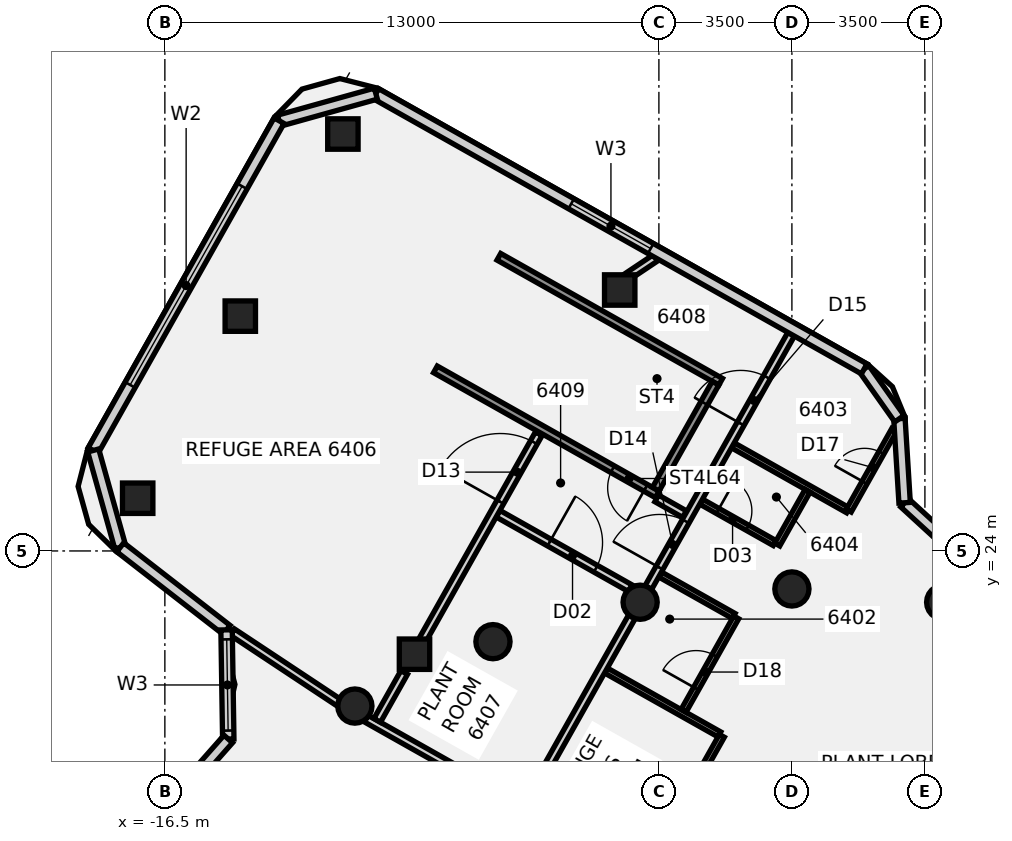
"""IFC4 building model, lengths in metres.
Left out: names, types, materials, properties, quantities, classifications, styles, units other than length and angle.
Written with IfcOpenShell. Run it as: python <this file> out.ifc"""

import sys

from ifc_helpers import new_model, si_unit, direction, frame, frame_2d, origin, origin_2d, place, context, subcontext, project, spatial, polyline, rectangle, circle, outline, extrude, element, fill, save


model = new_model("IFC4")
c1 = context("Model", 3, precision=1e-05, world=origin(), true_north=direction((0.0, 1.0)))
c2 = subcontext(c1, "Body", "Model", "MODEL_VIEW")
j1 = project(units=[si_unit("LENGTHUNIT", "METRE"), si_unit("PLANEANGLEUNIT", "RADIAN")], contexts=[c1])
p1 = place(None, origin())
s1 = spatial("IfcSite", under=j1, at=p1, CompositionType="ELEMENT")
p2 = place(p1, origin())
s2 = spatial("IfcBuilding", under=s1, at=p2, CompositionType="ELEMENT")
p3 = place(p2, frame((0.0, 0.0, 252.3)))
s3 = spatial("IfcBuildingStorey", under=s2, at=p3, CompositionType="ELEMENT", Elevation=252.3)
for number, where, z_axis, x_axis in (
    (1, (3.994, 22.651, -0.18), (0.0, 0.0, 1.0), (1.0, 0.0, 0.0)),
    (2, (0.0, 23.0, -0.18), (0.0, 0.0, 1.0), (1.0, 0.0, 0.0)),
    (3, (-3.994, 22.651, -0.18), (0.0, 0.0, 1.0), (1.0, 0.0, 0.0)),
    (4, (-7.866, 21.613, -0.18), (0.0, 0.0, 1.0), (1.0, 0.0, 0.0)),
    (5, (-11.5, 19.919, -0.18), (0.0, 0.0, 1.0), (1.0, 0.0, 0.0)),
):
    element("IfcColumn", number, at=place(p3, frame(where, z_axis=z_axis, x_axis=x_axis)), inside=s3, PredefinedType="COLUMN", context=c2, shape_type="SweptSolid", body=[
        extrude(circle(Radius=0.45, at=origin_2d()), origin(), (0.0, 0.0, 1.0), 4.54),
    ])
p4 = place(p3, frame((-9.931, 21.283, -0.176), z_axis=(0.003283481108, -0.039832393765, 0.999200980363), x_axis=(0.490053053062, 0.871063415319, 0.033113919684)))
e6 = element("IfcColumn", 6, at=p4, inside=s3, PredefinedType="COLUMN", context=c2, shape_type="SweptSolid", body=[
    extrude(rectangle(XDim=0.8, YDim=0.8, at=origin_2d()), origin(), (0.0, 0.0, 1.0), 4.536),
])
p5 = place(p3, frame((-4.531, 30.866, -0.176), z_axis=(-0.035416630126, -0.01851568505, 0.999201096736), x_axis=(0.870900727276, -0.490976523878, 0.02177099517)))
e7 = element("IfcColumn", 7, at=p5, inside=s3, PredefinedType="COLUMN", context=c2, shape_type="SweptSolid", body=[
    extrude(rectangle(XDim=0.8, YDim=0.8, at=origin_2d()), origin(), (0.0, 0.0, 1.0), 4.536),
])
p6 = place(p3, frame((-11.815, 34.97, -0.171), z_axis=(0.04557917309, -0.099952445458, 0.993947708699), x_axis=(0.49241467136, 0.86795246412, 0.064701711397)))
e8 = element("IfcColumn", 8, at=p6, inside=s3, PredefinedType="COLUMN", context=c2, shape_type="SweptSolid", body=[
    extrude(rectangle(XDim=0.8, YDim=0.8, at=origin_2d()), origin(), (0.0, 0.0, 1.0), 4.553),
])
p7 = place(p3, frame((-14.515, 30.179, -0.173), z_axis=(0.064654092079, -0.110323731976, 0.991790563849), x_axis=(0.493106310183, 0.867584962931, 0.064362247898)))
e9 = element("IfcColumn", 9, at=p7, inside=s3, PredefinedType="COLUMN", context=c2, shape_type="SweptSolid", body=[
    extrude(rectangle(XDim=0.8, YDim=0.8, at=origin_2d()), origin(), (0.0, 0.0, 1.0), 4.565),
])
p8 = place(p3, frame((-17.215, 25.387, -0.174), z_axis=(0.083639441686, -0.120581527785, 0.989173664708), x_axis=(0.493570945418, 0.867347744338, 0.063996970486)))
e10 = element("IfcColumn", 10, at=p8, inside=s3, PredefinedType="COLUMN", context=c2, shape_type="SweptSolid", body=[
    extrude(rectangle(XDim=0.8, YDim=0.8, at=origin_2d()), origin(), (0.0, 0.0, 1.0), 4.58),
])
p9 = place(p3, frame((-14.725, 21.866, 0.0), z_axis=(0.0, 0.0, 1.0), x_axis=(0.833781800799, -0.552094112137, 0.0)))
e11 = element("IfcWall", 11, at=p9, inside=s3, PredefinedType="PARTITIONING", context=c2, shape_type="SweptSolid", body=[
    extrude(rectangle(XDim=3.549, YDim=0.2, at=frame_2d((1.774, 0.0))), origin(), (0.0, 0.0, 1.0), 3.66),
])
p10 = place(p3, frame((-11.373, 19.686, 0.0), z_axis=(0.0, 0.0, 1.0), x_axis=(0.871198713454, -0.490930546693, 0.0)))
e12 = element("IfcWall", 12, at=p10, inside=s3, PredefinedType="PARTITIONING", context=c2, shape_type="SweptSolid", body=[
    extrude(rectangle(XDim=15.514, YDim=0.2, at=frame_2d((7.757, 0.0))), origin(), (0.0, 0.0, 1.0), 3.66),
])
p11 = place(p3, frame((-7.733, 24.98, 0.0), z_axis=(0.0, 0.0, 1.0), x_axis=(0.871188339902, -0.490948955003, 0.0)))
e13 = element("IfcWall", 13, at=p11, inside=s3, PredefinedType="PARTITIONING", context=c2, shape_type="SweptSolid", body=[
    extrude(rectangle(XDim=3.994, YDim=0.2, at=frame_2d((1.997, 0.0))), origin(), (0.0, 0.0, 1.0), 3.66),
])
p12 = place(p11, frame((1.55, 0.0, 0.0)))
e14 = element("IfcOpeningElement", 14, at=p12, cuts=e13, PredefinedType="OPENING", context=c2, shape_type="SweptSolid", body=[
    extrude(rectangle(XDim=1.4, YDim=2.1, at=frame_2d((0.7, 1.05))), frame((0.0, 0.11, 0.0), z_axis=(0.0, -1.0, 0.0), x_axis=(1.0, 0.0, 0.0)), (0.0, 0.0, 1.0), 0.22),
])
p13 = place(p3, frame((-4.893, 20.854, 0.0), z_axis=(0.0, 0.0, 1.0), x_axis=(0.871287977001, -0.490772107127, 0.0)))
e15 = element("IfcWall", 15, at=p13, inside=s3, PredefinedType="PARTITIONING", context=c2, shape_type="SweptSolid", body=[
    extrude(rectangle(XDim=3.426, YDim=0.15, at=frame_2d((1.713, 0.0))), origin(), (0.0, 0.0, 1.0), 3.66),
])
p14 = place(p3, frame((-3.558, 25.382, 0.0), z_axis=(0.0, 0.0, 1.0), x_axis=(0.87131936668, -0.490716375566, 0.0)))
e16 = element("IfcWall", 16, at=p14, inside=s3, PredefinedType="PARTITIONING", context=c2, shape_type="SweptSolid", body=[
    extrude(rectangle(XDim=0.84, YDim=0.2, at=frame_2d((0.42, 0.0))), origin(), (0.0, 0.0, 1.0), 3.66),
])
p15 = place(p3, frame((-3.469, 23.381, 0.0), z_axis=(0.0, 0.0, 1.0), x_axis=(0.871285294393, -0.490776869641, 0.0)))
e17 = element("IfcWall", 17, at=p15, inside=s3, PredefinedType="PARTITIONING", context=c2, shape_type="SweptSolid", body=[
    extrude(rectangle(XDim=2.225, YDim=0.15, at=frame_2d((1.113, 0.0))), origin(), (0.0, 0.0, 1.0), 3.66),
])
p16 = place(p3, frame((-2.389, 25.298, 0.0), z_axis=(0.0, 0.0, 1.0), x_axis=(0.871090637824, -0.491122286906, 0.0)))
e18 = element("IfcWall", 18, at=p16, inside=s3, PredefinedType="PARTITIONING", context=c2, shape_type="SweptSolid", body=[
    extrude(rectangle(XDim=2.22, YDim=0.15, at=frame_2d((1.11, 0.0))), origin(), (0.0, 0.0, 1.0), 3.66),
])
p17 = place(p16, frame((0.5, 0.0, 0.0)))
e19 = element("IfcOpeningElement", 19, at=p17, cuts=e18, PredefinedType="OPENING", context=c2, shape_type="SweptSolid", body=[
    extrude(rectangle(XDim=0.9, YDim=2.1, at=frame_2d((0.45, 1.05))), frame((0.0, 0.085, 0.0), z_axis=(0.0, -1.0, 0.0), x_axis=(1.0, 0.0, 0.0)), (0.0, 0.0, 1.0), 0.17),
])
p18 = place(p3, frame((-1.554, 26.779, 0.0), z_axis=(0.0, 0.0, 1.0), x_axis=(0.870988474872, -0.491303446599, 0.0)))
e20 = element("IfcWall", 20, at=p18, inside=s3, PredefinedType="PARTITIONING", context=c2, shape_type="SweptSolid", body=[
    extrude(rectangle(XDim=3.48, YDim=0.15, at=frame_2d((1.74, 0.0))), origin(), (0.0, 0.0, 1.0), 3.66),
])
p19 = place(p3, frame((-10.913, 19.541, 0.0), z_axis=(0.0, 0.0, 1.0), x_axis=(0.490861767795, 0.871237467581, 0.0)))
e21 = element("IfcWall", 21, at=p19, inside=s3, PredefinedType="PARTITIONING", context=c2, shape_type="SweptSolid", body=[
    extrude(rectangle(XDim=1.447, YDim=0.2, at=frame_2d((0.724, 0.0))), origin(), (0.0, 0.0, 1.0), 3.66),
])
p20 = place(p3, frame((-9.735, 21.632, 0.0), z_axis=(0.0, 0.0, 1.0), x_axis=(0.490972161339, 0.87117526181, 0.0)))
e22 = element("IfcWall", 22, at=p20, inside=s3, PredefinedType="PARTITIONING", context=c2, shape_type="SweptSolid", body=[
    extrude(rectangle(XDim=6.26, YDim=0.2, at=frame_2d((3.13, 0.0))), origin(), (0.0, 0.0, 1.0), 3.66),
])
p21 = place(p20, frame((4.199, 0.0, 0.0)))
e23 = element("IfcOpeningElement", 23, at=p21, cuts=e22, PredefinedType="OPENING", context=c2, shape_type="SweptSolid", body=[
    extrude(rectangle(XDim=1.8, YDim=2.1, at=frame_2d((0.9, 1.05))), frame((0.0, 0.11, 0.0), z_axis=(0.0, -1.0, 0.0), x_axis=(1.0, 0.0, 0.0)), (0.0, 0.0, 1.0), 0.22),
])
p22 = place(p3, frame((-4.333, 31.216, 0.0), z_axis=(0.0, 0.0, 1.0), x_axis=(0.831335326715, 0.555771153044, 0.0)))
e24 = element("IfcWall", 24, at=p22, inside=s3, PredefinedType="PARTITIONING", context=c2, shape_type="SweptSolid", body=[
    extrude(rectangle(XDim=0.894, YDim=0.2, at=frame_2d((0.447, 0.0))), origin(), (0.0, 0.0, 1.0), 3.66),
])
p23 = place(p3, frame((-6.983, 17.348, 0.0), z_axis=(0.0, 0.0, 1.0), x_axis=(0.490949267778, 0.871188163641, 0.0)))
e25 = element("IfcWall", 25, at=p23, inside=s3, PredefinedType="PARTITIONING", context=c2, shape_type="SweptSolid", body=[
    extrude(rectangle(XDim=5.862, YDim=0.2, at=frame_2d((2.931, 0.0))), origin(), (0.0, 0.0, 1.0), 3.66),
])
p24 = place(p3, frame((-3.885, 22.847, 0.0), z_axis=(0.0, 0.0, 1.0), x_axis=(0.490960829695, 0.871181647939, 0.0)))
e26 = element("IfcWall", 26, at=p24, inside=s3, PredefinedType="PARTITIONING", context=c2, shape_type="SweptSolid", body=[
    extrude(rectangle(XDim=7.868, YDim=0.2, at=frame_2d((3.934, 0.0))), origin(), (0.0, 0.0, 1.0), 3.66),
])
p25 = place(p24, frame((0.819, 0.0, 0.0)))
e27 = element("IfcOpeningElement", 27, at=p25, cuts=e26, PredefinedType="OPENING", context=c2, shape_type="SweptSolid", body=[
    extrude(rectangle(XDim=1.4, YDim=2.1, at=frame_2d((0.7, 1.05))), frame((0.0, 0.11, 0.0), z_axis=(0.0, -1.0, 0.0), x_axis=(1.0, 0.0, 0.0)), (0.0, 0.0, 1.0), 0.22),
])
p26 = place(p24, frame((5.17, 0.0, 0.0)))
e28 = element("IfcOpeningElement", 28, at=p26, cuts=e26, PredefinedType="OPENING", context=c2, shape_type="SweptSolid", body=[
    extrude(rectangle(XDim=1.4, YDim=2.1, at=frame_2d((0.7, 1.05))), frame((0.0, 0.11, 0.0), z_axis=(0.0, -1.0, 0.0), x_axis=(1.0, 0.0, 0.0)), (0.0, 0.0, 1.0), 0.22),
])
p27 = place(p3, frame((-3.856, 15.564, 0.0), z_axis=(0.0, 0.0, 1.0), x_axis=(0.49096787186, 0.871177679237, 0.0)))
e29 = element("IfcWall", 29, at=p27, inside=s3, PredefinedType="PARTITIONING", context=c2, shape_type="SweptSolid", body=[
    extrude(rectangle(XDim=4.1, YDim=0.15, at=frame_2d((2.05, 0.0))), origin(), (0.0, 0.0, 1.0), 3.66),
])
p28 = place(p27, frame((2.0, 0.0, 0.0)))
e30 = element("IfcOpeningElement", 30, at=p28, cuts=e29, PredefinedType="OPENING", context=c2, shape_type="SweptSolid", body=[
    extrude(rectangle(XDim=0.9, YDim=2.1, at=frame_2d((0.45, 1.05))), frame((0.0, 0.085, 0.0), z_axis=(0.0, -1.0, 0.0), x_axis=(1.0, 0.0, 0.0)), (0.0, 0.0, 1.0), 0.17),
])
p29 = place(p3, frame((1.495, 25.06, 0.0), z_axis=(0.0, 0.0, 1.0), x_axis=(0.490981386235, 0.87117006283, 0.0)))
e31 = element("IfcWall", 31, at=p29, inside=s3, PredefinedType="PARTITIONING", context=c2, shape_type="SweptSolid", body=[
    extrude(rectangle(XDim=2.446, YDim=0.15, at=frame_2d((1.223, 0.0))), origin(), (0.0, 0.0, 1.0), 3.66),
])
p30 = place(p29, frame((0.85, 0.0, 0.0)))
e32 = element("IfcOpeningElement", 32, at=p30, cuts=e31, PredefinedType="OPENING", context=c2, shape_type="SweptSolid", body=[
    extrude(rectangle(XDim=0.9, YDim=2.1, at=frame_2d((0.45, 1.05))), frame((0.0, 0.085, 0.0), z_axis=(0.0, -1.0, 0.0), x_axis=(1.0, 0.0, 0.0)), (0.0, 0.0, 1.0), 0.17),
])
p31 = place(p3, frame((-2.85, 19.795, 0.0), z_axis=(0.0, 0.0, 1.0), x_axis=(0.490881675971, 0.871226250865, 0.0)))
e33 = element("IfcWall", 33, at=p31, inside=s3, PredefinedType="PARTITIONING", context=c2, shape_type="SweptSolid", body=[
    extrude(rectangle(XDim=2.821, YDim=0.15, at=frame_2d((1.41, 0.0))), origin(), (0.0, 0.0, 1.0), 3.66),
])
p32 = place(p31, frame((0.67, 0.0, 0.0)))
e34 = element("IfcOpeningElement", 34, at=p32, cuts=e33, PredefinedType="OPENING", context=c2, shape_type="SweptSolid", body=[
    extrude(rectangle(XDim=1.0, YDim=2.1, at=frame_2d((0.5, 1.05))), frame((0.0, 0.085, 0.0), z_axis=(0.0, -1.0, 0.0), x_axis=(1.0, 0.0, 0.0)), (0.0, 0.0, 1.0), 0.17),
])
p33 = place(p3, frame((-0.385, 24.168, 0.0), z_axis=(0.0, 0.0, 1.0), x_axis=(0.490967443079, 0.871177920884, 0.0)))
e35 = element("IfcWall", 35, at=p33, inside=s3, PredefinedType="PARTITIONING", context=c2, shape_type="SweptSolid", body=[
    extrude(rectangle(XDim=1.625, YDim=0.15, at=frame_2d((0.812, 0.0))), origin(), (0.0, 0.0, 1.0), 3.66),
])
p34 = place(p3, frame((5.107, 23.306, 0.0), z_axis=(0.0, 0.0, 1.0), x_axis=(-0.737248359807, 0.675621829104, 0.0)))
e36 = element("IfcWall", 36, at=p34, inside=s3, PredefinedType="SOLIDWALL", context=c2, shape_type="SweptSolid", body=[
    extrude(rectangle(XDim=2.904, YDim=0.3, at=frame_2d((1.452, 0.0))), origin(), (0.0, 0.0, 1.0), 4.36),
])
p35 = place(p3, frame((2.966, 25.268, 0.0), z_axis=(0.0, 0.0, 1.0), x_axis=(-0.061658520666, 0.998097303287, 0.0)))
e37 = element("IfcWall", 37, at=p35, inside=s3, PredefinedType="SOLIDWALL", context=c2, shape_type="SweptSolid", body=[
    extrude(rectangle(XDim=2.217, YDim=0.3, at=frame_2d((1.109, 0.0))), origin(), (0.0, 0.0, 1.0), 4.36),
])
p36 = place(p3, frame((2.829, 27.481, 0.0), z_axis=(0.0, 0.0, 1.0), x_axis=(-0.577459771893, 0.816419139808, 0.0)))
e38 = element("IfcWall", 38, at=p36, inside=s3, PredefinedType="SOLIDWALL", context=c2, shape_type="SweptSolid", body=[
    extrude(rectangle(XDim=1.604, YDim=0.3, at=frame_2d((0.802, 0.0))), origin(), (0.0, 0.0, 1.0), 4.36),
])
p37 = place(p3, frame((1.903, 28.791, 0.0), z_axis=(0.0, 0.0, 1.0), x_axis=(-0.871199573744, 0.490929020031, 0.0)))
e39 = element("IfcWall", 39, at=p37, inside=s3, PredefinedType="SOLIDWALL", context=c2, shape_type="SweptSolid", body=[
    extrude(rectangle(XDim=14.751, YDim=0.3, at=frame_2d((7.375, 0.0))), origin(), (0.0, 0.0, 1.0), 4.36),
])
p38 = place(p37, frame((6.45, 0.0, 1.4)))
e40 = element("IfcOpeningElement", 40, at=p38, cuts=e39, PredefinedType="OPENING", context=c2, shape_type="SweptSolid", body=[
    extrude(rectangle(XDim=2.4, YDim=2.1, at=frame_2d((1.2, 1.05))), frame((0.0, 0.16, 0.0), z_axis=(0.0, -1.0, 0.0), x_axis=(1.0, 0.0, 0.0)), (0.0, 0.0, 1.0), 0.32),
])
p39 = place(p3, frame((-10.948, 36.032, 0.0), z_axis=(0.0, 0.0, 1.0), x_axis=(-0.963178509749, -0.268862712844, 0.0)))
e41 = element("IfcWall", 41, at=p39, inside=s3, PredefinedType="SOLIDWALL", context=c2, shape_type="SweptSolid", body=[
    extrude(rectangle(XDim=2.644, YDim=0.3, at=frame_2d((1.322, 0.0))), origin(), (0.0, 0.0, 1.0), 4.36),
])
p40 = place(p3, frame((-13.495, 35.321, 0.0), z_axis=(0.0, 0.0, 1.0), x_axis=(-0.490922083825, -0.871203482324, 0.0)))
e42 = element("IfcWall", 42, at=p40, inside=s3, PredefinedType="SOLIDWALL", context=c2, shape_type="SweptSolid", body=[
    extrude(rectangle(XDim=9.961, YDim=0.3, at=frame_2d((4.98, 0.0))), origin(), (0.0, 0.0, 1.0), 4.36),
])
p41 = place(p40, frame((1.98, 0.0, 1.4)))
e43 = element("IfcOpeningElement", 43, at=p41, cuts=e42, PredefinedType="OPENING", context=c2, shape_type="SweptSolid", body=[
    extrude(rectangle(XDim=6.0, YDim=2.6, at=frame_2d((3.0, 1.3))), frame((0.0, 0.16, 0.0), z_axis=(0.0, -1.0, 0.0), x_axis=(1.0, 0.0, 0.0)), (0.0, 0.0, 1.0), 0.32),
])
p42 = place(p3, frame((-18.385, 26.644, 0.0), z_axis=(0.0, 0.0, 1.0), x_axis=(0.269047880209, -0.963126802739, 0.0)))
e44 = element("IfcWall", 44, at=p42, inside=s3, PredefinedType="SOLIDWALL", context=c2, shape_type="SweptSolid", body=[
    extrude(rectangle(XDim=2.645, YDim=0.3, at=frame_2d((1.323, 0.0))), origin(), (0.0, 0.0, 1.0), 4.36),
])
p43 = place(p3, frame((-17.673, 24.096, 0.0), z_axis=(0.0, 0.0, 1.0), x_axis=(0.789786309294, -0.613382087815, 0.0)))
e45 = element("IfcWall", 45, at=p43, inside=s3, PredefinedType="SOLIDWALL", context=c2, shape_type="SweptSolid", body=[
    extrude(rectangle(XDim=3.542, YDim=0.3, at=frame_2d((1.771, 0.0))), origin(), (0.0, 0.0, 1.0), 4.36),
])
p44 = place(p3, frame((-14.876, 21.924, 0.0), z_axis=(0.0, 0.0, 1.0), x_axis=(0.015552729789, -0.999879048983, 0.0)))
e46 = element("IfcWall", 46, at=p44, inside=s3, PredefinedType="SOLIDWALL", context=c2, shape_type="SweptSolid", body=[
    extrude(rectangle(XDim=2.873, YDim=0.3, at=frame_2d((1.436, 0.0))), origin(), (0.0, 0.0, 1.0), 4.36),
])
p45 = place(p44, frame((0.25, 0.0, 1.4)))
e47 = element("IfcOpeningElement", 47, at=p45, cuts=e46, PredefinedType="OPENING", context=c2, shape_type="SweptSolid", body=[
    extrude(rectangle(XDim=2.4, YDim=2.1, at=frame_2d((1.2, 1.05))), frame((0.0, 0.16, 0.0), z_axis=(0.0, -1.0, 0.0), x_axis=(1.0, 0.0, 0.0)), (0.0, 0.0, 1.0), 0.32),
])
p46 = place(p3, frame((-14.832, 19.051, 0.0), z_axis=(0.0, 0.0, 1.0), x_axis=(-0.662323524688, -0.749217958037, 0.0)))
e48 = element("IfcWall", 48, at=p46, inside=s3, PredefinedType="SOLIDWALL", context=c2, shape_type="SweptSolid", body=[
    extrude(rectangle(XDim=2.104, YDim=0.3, at=frame_2d((1.052, 0.0))), origin(), (0.0, 0.0, 1.0), 4.36),
])
p47 = place(p3, frame((-3.544, 25.489, -0.18), z_axis=(0.0, 0.0, 1.0), x_axis=(-0.871189898328, 0.490946189567, 0.0)))
e49 = element("IfcWall", 49, at=p47, inside=s3, PredefinedType="SHEAR", context=c2, shape_type="SweptSolid", body=[
    extrude(rectangle(XDim=6.7, YDim=0.2, at=frame_2d((3.35, 0.0))), origin(), (0.0, 0.0, 1.0), 3.944),
])
p48 = place(p47, frame((0.35, 0.0, 0.0)))
e50 = element("IfcOpeningElement", 50, at=p48, cuts=e49, PredefinedType="OPENING", context=c2, shape_type="SweptSolid", body=[
    extrude(rectangle(XDim=1.0, YDim=2.1, at=frame_2d((0.5, 1.05))), frame((0.0, 0.11, 0.0), z_axis=(0.0, -1.0, 0.0), x_axis=(1.0, 0.0, 0.0)), (0.0, 0.0, 1.0), 0.22),
])
p49 = place(p3, frame((-1.875, 28.451, -0.18), z_axis=(0.0, 0.0, 1.0), x_axis=(-0.871205483509, 0.490918532451, 0.0)))
e51 = element("IfcWall", 51, at=p49, inside=s3, PredefinedType="SHEAR", context=c2, shape_type="SweptSolid", body=[
    extrude(rectangle(XDim=6.7, YDim=0.2, at=frame_2d((3.35, 0.0))), origin(), (0.0, 0.0, 1.0), 3.944),
])
p50 = place(p3, frame((-2.01, 28.413, -0.18), z_axis=(0.0, 0.0, 1.0), x_axis=(-0.490945688221, -0.871190180854, 0.0)))
e52 = element("IfcWall", 52, at=p50, inside=s3, PredefinedType="SHEAR", context=c2, shape_type="SweptSolid", body=[
    extrude(rectangle(XDim=3.2, YDim=0.2, at=frame_2d((1.6, 0.0))), origin(), (0.0, 0.0, 1.0), 4.54),
])
p51 = place(p3, frame((0.0, 0.0, -0.18)))
e53 = element("IfcWall", 53, at=p51, inside=s3, PredefinedType="SHEAR", context=c2, shape_type="SweptSolid", body=[
    extrude(outline(polyline([(-7.586, 31.555), (-7.76, 31.653), (-9.332, 28.865), (-9.157, 28.767), (-7.586, 31.555)])), origin(), (0.0, 0.0, 1.0), 3.944),
])
p52 = place(p12, frame((1.4, 0.0, 0.0), z_axis=(0.0, 0.0, 1.0), x_axis=(-1.0, 0.0, 0.0)))
e54 = element("IfcDoor", 54, at=p52, inside=s3, OperationType="DOUBLE_DOOR_SINGLE_SWING", PredefinedType="DOOR", context=c2, shape_type="SweptSolid", body=[
    extrude(rectangle(XDim=1.4, YDim=2.1, at=frame_2d((0.7, 1.05))), frame((0.0, 0.025, 0.0), z_axis=(0.0, -1.0, 0.0), x_axis=(1.0, 0.0, 0.0)), (0.0, 0.0, 1.0), 0.05),
])
fill(e14, e54)
p53 = place(p17, origin())
e55 = element("IfcDoor", 55, at=p53, inside=s3, OperationType="SINGLE_SWING_RIGHT", PredefinedType="DOOR", context=c2, shape_type="SweptSolid", body=[
    extrude(rectangle(XDim=0.9, YDim=2.1, at=frame_2d((0.45, 1.05))), frame((0.0, 0.025, 0.0), z_axis=(0.0, -1.0, 0.0), x_axis=(1.0, 0.0, 0.0)), (0.0, 0.0, 1.0), 0.05),
])
fill(e19, e55)
p54 = place(p21, origin())
e56 = element("IfcDoor", 56, at=p54, inside=s3, OperationType="DOUBLE_DOOR_SINGLE_SWING", PredefinedType="DOOR", context=c2, shape_type="SweptSolid", body=[
    extrude(rectangle(XDim=1.8, YDim=2.1, at=frame_2d((0.9, 1.05))), frame((0.0, 0.025, 0.0), z_axis=(0.0, -1.0, 0.0), x_axis=(1.0, 0.0, 0.0)), (0.0, 0.0, 1.0), 0.05),
])
fill(e23, e56)
p55 = place(p25, frame((1.4, 0.0, 0.0), z_axis=(0.0, 0.0, 1.0), x_axis=(-1.0, 0.0, 0.0)))
e57 = element("IfcDoor", 57, at=p55, inside=s3, OperationType="DOUBLE_DOOR_SINGLE_SWING", PredefinedType="DOOR", context=c2, shape_type="SweptSolid", body=[
    extrude(rectangle(XDim=1.4, YDim=2.1, at=frame_2d((0.7, 1.05))), frame((0.0, 0.025, 0.0), z_axis=(0.0, -1.0, 0.0), x_axis=(1.0, 0.0, 0.0)), (0.0, 0.0, 1.0), 0.05),
])
fill(e27, e57)
p56 = place(p26, origin())
e58 = element("IfcDoor", 58, at=p56, inside=s3, OperationType="DOUBLE_DOOR_SINGLE_SWING", PredefinedType="DOOR", context=c2, shape_type="SweptSolid", body=[
    extrude(rectangle(XDim=1.4, YDim=2.1, at=frame_2d((0.7, 1.05))), frame((0.0, 0.025, 0.0), z_axis=(0.0, -1.0, 0.0), x_axis=(1.0, 0.0, 0.0)), (0.0, 0.0, 1.0), 0.05),
])
fill(e28, e58)
p57 = place(p30, origin())
e59 = element("IfcDoor", 59, at=p57, inside=s3, OperationType="SINGLE_SWING_LEFT", PredefinedType="DOOR", context=c2, shape_type="SweptSolid", body=[
    extrude(rectangle(XDim=0.9, YDim=2.1, at=frame_2d((0.45, 1.05))), frame((0.0, 0.025, 0.0), z_axis=(0.0, -1.0, 0.0), x_axis=(1.0, 0.0, 0.0)), (0.0, 0.0, 1.0), 0.05),
])
fill(e32, e59)
p58 = place(p32, origin())
e60 = element("IfcDoor", 60, at=p58, inside=s3, OperationType="SINGLE_SWING_RIGHT", PredefinedType="DOOR", context=c2, shape_type="SweptSolid", body=[
    extrude(rectangle(XDim=1.0, YDim=2.1, at=frame_2d((0.5, 1.05))), frame((0.0, 0.025, 0.0), z_axis=(0.0, -1.0, 0.0), x_axis=(1.0, 0.0, 0.0)), (0.0, 0.0, 1.0), 0.05),
])
fill(e34, e60)
p59 = place(p38, origin())
e61 = element("IfcWindow", 61, at=p59, inside=s3, PartitioningType="SINGLE_PANEL", PredefinedType="WINDOW", context=c2, shape_type="SweptSolid", body=[
    extrude(rectangle(XDim=2.4, YDim=2.1, at=frame_2d((1.2, 1.05))), frame((0.0, 0.03, 0.0), z_axis=(0.0, -1.0, 0.0), x_axis=(1.0, 0.0, 0.0)), (0.0, 0.0, 1.0), 0.06),
])
fill(e40, e61)
p60 = place(p41, origin())
e62 = element("IfcWindow", 62, at=p60, inside=s3, PartitioningType="SINGLE_PANEL", PredefinedType="WINDOW", context=c2, shape_type="SweptSolid", body=[
    extrude(rectangle(XDim=6.0, YDim=2.6, at=frame_2d((3.0, 1.3))), frame((0.0, 0.03, 0.0), z_axis=(0.0, -1.0, 0.0), x_axis=(1.0, 0.0, 0.0)), (0.0, 0.0, 1.0), 0.06),
])
fill(e43, e62)
p61 = place(p45, origin())
e63 = element("IfcWindow", 63, at=p61, inside=s3, PartitioningType="SINGLE_PANEL", PredefinedType="WINDOW", context=c2, shape_type="SweptSolid", body=[
    extrude(rectangle(XDim=2.4, YDim=2.1, at=frame_2d((1.2, 1.05))), frame((0.0, 0.03, 0.0), z_axis=(0.0, -1.0, 0.0), x_axis=(1.0, 0.0, 0.0)), (0.0, 0.0, 1.0), 0.06),
])
fill(e47, e63)
p62 = place(p48, origin())
e64 = element("IfcDoor", 64, at=p62, inside=s3, OperationType="SINGLE_SWING_LEFT", PredefinedType="DOOR", context=c2, shape_type="SweptSolid", body=[
    extrude(rectangle(XDim=1.0, YDim=2.1, at=frame_2d((0.5, 1.05))), frame((0.0, 0.025, 0.0), z_axis=(0.0, -1.0, 0.0), x_axis=(1.0, 0.0, 0.0)), (0.0, 0.0, 1.0), 0.05),
])
fill(e50, e64)
save(model, sys.argv[1])
